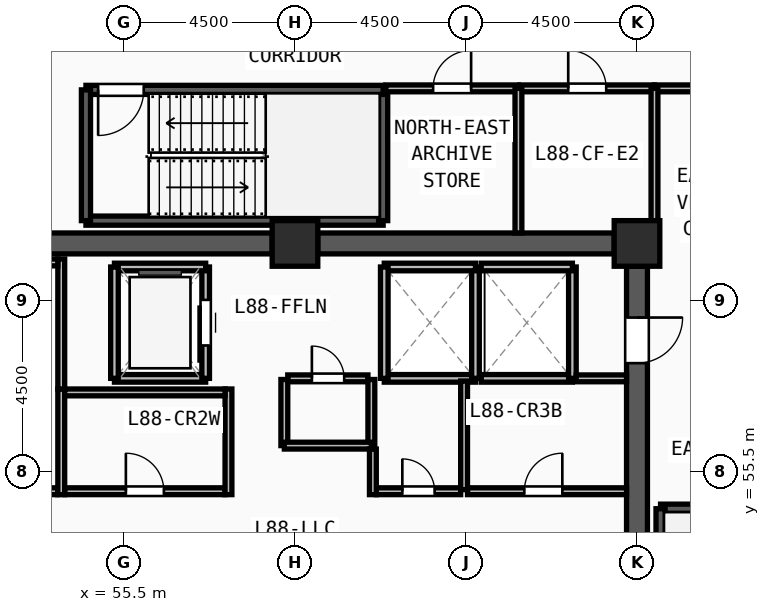
"""IFC4 building model, lengths in metres.
Left out: names, types, materials, properties, quantities, classifications, styles, units other than length and angle.
Written with IfcOpenShell. Run it as: python <this file> out.ifc"""

import sys

from ifc_helpers import new_model, si_unit, direction, frame, frame_2d, origin, origin_2d, place, context, subcontext, project, spatial, rectangle, extrude, source, transform, mapped, element, fill, save


model = new_model("IFC4")
c1 = context("Model", 3, precision=1e-05, world=origin(), true_north=direction((0.0, 1.0)))
c2 = subcontext(c1, "Body", "Model", "MODEL_VIEW")
j1 = project(units=[si_unit("LENGTHUNIT", "METRE"), si_unit("PLANEANGLEUNIT", "RADIAN")], contexts=[c1])
p1 = place(None, origin())
s1 = spatial("IfcSite", under=j1, at=p1, CompositionType="ELEMENT")
p2 = place(p1, origin())
s2 = spatial("IfcBuilding", under=s1, at=p2, CompositionType="ELEMENT")
p3 = place(p2, frame((0.0, 0.0, 339.75)))
s3 = spatial("IfcBuildingStorey", under=s2, at=p3, CompositionType="ELEMENT", Elevation=339.75)
m1 = source(origin(), c2, "Body", "SweptSolid", [
    extrude(rectangle(XDim=1.2, YDim=1.2, at=origin_2d()), origin(), (0.0, 0.0, 1.0), 3.75),
])
for number, where, z_axis, x_axis in (
    (1, (69.0, 61.5, 0.0), (0.0, 0.0, 1.0), (1.0, 0.0, 0.0)),
    (2, (60.0, 61.5, 0.0), (0.0, 0.0, 1.0), (1.0, 0.0, 0.0)),
):
    element("IfcColumn", number, at=place(p3, frame(where, z_axis=z_axis, x_axis=x_axis)), inside=s3, PredefinedType="COLUMN", context=c2, shape_type="MappedRepresentation", body=[
        mapped(m1, transform((0.0, 0.0, 0.0), x_axis=(1.0, 0.0, 0.0), y_axis=(0.0, 1.0, 0.0), z_axis=(0.0, 0.0, 1.0), scale=1.0)),
    ])
for number, where, z_axis, x_axis in (
    (3, (51.6, 61.5, 0.0), (0.0, 0.0, 1.0), (1.0, 0.0, 0.0)),
    (4, (60.6, 61.5, 0.0), (0.0, 0.0, 1.0), (1.0, 0.0, 0.0)),
):
    element("IfcWall", number, at=place(p3, frame(where, z_axis=z_axis, x_axis=x_axis)), inside=s3, PredefinedType="SHEAR", context=c2, shape_type="SweptSolid", body=[
        extrude(rectangle(XDim=7.8, YDim=0.55, at=frame_2d((3.9, 0.0))), origin(), (0.0, 0.0, 1.0), 3.57),
    ])
p4 = place(p3, frame((69.0, 60.9, 0.0), z_axis=(0.0, 0.0, 1.0), x_axis=(0.0, -1.0, 0.0)))
e5 = element("IfcWall", 5, at=p4, inside=s3, PredefinedType="SHEAR", context=c2, shape_type="SweptSolid", body=[
    extrude(rectangle(XDim=13.8, YDim=0.55, at=frame_2d((6.9, 0.0))), origin(), (0.0, 0.0, 1.0), 3.57),
])
m2 = source(origin(), c2, "Body", "SweptSolid", [
    extrude(rectangle(XDim=1.2, YDim=2.2, at=frame_2d((0.6, 1.1))), frame((0.0, 0.285, 0.0), z_axis=(0.0, -1.0, 0.0), x_axis=(1.0, 0.0, 0.0)), (0.0, 0.0, 1.0), 0.57),
])
p5 = place(p4, frame((1.35, 0.0, 0.0)))
e6 = element("IfcOpeningElement", 6, at=p5, cuts=e5, PredefinedType="OPENING", context=c2, shape_type="MappedRepresentation", body=[
    mapped(m2, transform((0.0, 0.0, 0.0), x_axis=(1.0, 0.0, 0.0), y_axis=(0.0, 1.0, 0.0), z_axis=(0.0, 0.0, 1.0), scale=1.0)),
])
p6 = place(p3, frame((73.06, 54.52, 0.0), z_axis=(0.0, 0.0, 1.0), x_axis=(-1.0, 0.0, 0.0)))
e7 = element("IfcWall", 7, at=p6, inside=s3, PredefinedType="SOLIDWALL", context=c2, shape_type="SweptSolid", body=[
    extrude(rectangle(XDim=3.44, YDim=0.24, at=frame_2d((1.72, 0.0))), origin(), (0.0, 0.0, 1.0), 3.57),
])
for number, where, z_axis, x_axis in (
    (8, (69.62, 54.52, 0.0), (0.0, 0.0, 1.0), (0.0, -1.0, 0.0)),
    (9, (54.5, 62.1, 0.0), (0.0, 0.0, 1.0), (1.0, 0.0, 0.0)),
):
    element("IfcWall", number, at=place(p3, frame(where, z_axis=z_axis, x_axis=x_axis)), inside=s3, PredefinedType="SOLIDWALL", context=c2, shape_type="SweptSolid", body=[
        extrude(rectangle(XDim=7.82, YDim=0.24, at=frame_2d((3.91, 0.0))), origin(), (0.0, 0.0, 1.0), 3.57),
    ])
p7 = place(p3, frame((62.32, 62.1, 0.0), z_axis=(0.0, 0.0, 1.0), x_axis=(0.0, 1.0, 0.0)))
e10 = element("IfcWall", 10, at=p7, inside=s3, PredefinedType="SOLIDWALL", context=c2, shape_type="SweptSolid", body=[
    extrude(rectangle(XDim=3.44, YDim=0.24, at=frame_2d((1.72, 0.0))), origin(), (0.0, 0.0, 1.0), 3.57),
])
p8 = place(p3, frame((62.32, 65.54, 0.0), z_axis=(0.0, 0.0, 1.0), x_axis=(-1.0, 0.0, 0.0)))
e11 = element("IfcWall", 11, at=p8, inside=s3, PredefinedType="SOLIDWALL", context=c2, shape_type="SweptSolid", body=[
    extrude(rectangle(XDim=7.82, YDim=0.24, at=frame_2d((3.91, 0.0))), origin(), (0.0, 0.0, 1.0), 3.57),
])
m3 = source(origin(), c2, "Body", "SweptSolid", [
    extrude(rectangle(XDim=1.2, YDim=2.2, at=frame_2d((0.6, 1.1))), frame((0.0, 0.13, 0.0), z_axis=(0.0, -1.0, 0.0), x_axis=(1.0, 0.0, 0.0)), (0.0, 0.0, 1.0), 0.26),
])
p9 = place(p8, frame((6.3, 0.0, 0.0)))
e12 = element("IfcOpeningElement", 12, at=p9, cuts=e11, PredefinedType="OPENING", context=c2, shape_type="MappedRepresentation", body=[
    mapped(m3, transform((0.0, 0.0, 0.0), x_axis=(1.0, 0.0, 0.0), y_axis=(0.0, 1.0, 0.0), z_axis=(0.0, 0.0, 1.0), scale=1.0)),
])
p10 = place(p3, frame((54.5, 65.54, 0.0), z_axis=(0.0, 0.0, 1.0), x_axis=(0.0, -1.0, 0.0)))
e13 = element("IfcWall", 13, at=p10, inside=s3, PredefinedType="SOLIDWALL", context=c2, shape_type="SweptSolid", body=[
    extrude(rectangle(XDim=3.44, YDim=0.24, at=frame_2d((1.72, 0.0))), origin(), (0.0, 0.0, 1.0), 3.57),
])
p11 = place(p3, frame((55.25, 57.95, 0.0), z_axis=(0.0, 0.0, 1.0), x_axis=(1.0, 0.0, 0.0)))
e14 = element("IfcWall", 14, at=p11, inside=s3, PredefinedType="SOLIDWALL", context=c2, shape_type="SweptSolid", body=[
    extrude(rectangle(XDim=2.4, YDim=0.2, at=frame_2d((1.2, 0.0))), origin(), (0.0, 0.0, 1.0), 3.57),
])
p12 = place(p3, frame((57.65, 57.95, 0.0), z_axis=(0.0, 0.0, 1.0), x_axis=(0.0, 1.0, 0.0)))
e15 = element("IfcWall", 15, at=p12, inside=s3, PredefinedType="SOLIDWALL", context=c2, shape_type="SweptSolid", body=[
    extrude(rectangle(XDim=2.93, YDim=0.2, at=frame_2d((1.465, 0.0))), origin(), (0.0, 0.0, 1.0), 3.57),
])
m4 = source(origin(), c2, "Body", "SweptSolid", [
    extrude(rectangle(XDim=1.2, YDim=2.3, at=frame_2d((0.6, 1.15))), frame((0.0, 0.11, 0.0), z_axis=(0.0, -1.0, 0.0), x_axis=(1.0, 0.0, 0.0)), (0.0, 0.0, 1.0), 0.22),
])
p13 = place(p12, frame((0.865, 0.0, 0.0)))
e16 = element("IfcOpeningElement", 16, at=p13, cuts=e15, PredefinedType="OPENING", context=c2, shape_type="MappedRepresentation", body=[
    mapped(m4, transform((0.0, 0.0, 0.0), x_axis=(1.0, 0.0, 0.0), y_axis=(0.0, 1.0, 0.0), z_axis=(0.0, 0.0, 1.0), scale=1.0)),
])
p14 = place(p3, frame((57.65, 60.88, 0.0), z_axis=(0.0, 0.0, 1.0), x_axis=(-1.0, 0.0, 0.0)))
e17 = element("IfcWall", 17, at=p14, inside=s3, PredefinedType="SOLIDWALL", context=c2, shape_type="SweptSolid", body=[
    extrude(rectangle(XDim=2.4, YDim=0.2, at=frame_2d((1.2, 0.0))), origin(), (0.0, 0.0, 1.0), 3.57),
])
p15 = place(p3, frame((55.25, 60.88, 0.0), z_axis=(0.0, 0.0, 1.0), x_axis=(0.0, -1.0, 0.0)))
e18 = element("IfcWall", 18, at=p15, inside=s3, PredefinedType="SOLIDWALL", context=c2, shape_type="SweptSolid", body=[
    extrude(rectangle(XDim=2.93, YDim=0.2, at=frame_2d((1.465, 0.0))), origin(), (0.0, 0.0, 1.0), 3.57),
])
p16 = place(p3, frame((62.35, 57.95, 0.0), z_axis=(0.0, 0.0, 1.0), x_axis=(1.0, 0.0, 0.0)))
e19 = element("IfcWall", 19, at=p16, inside=s3, PredefinedType="SOLIDWALL", context=c2, shape_type="SweptSolid", body=[
    extrude(rectangle(XDim=2.4, YDim=0.2, at=frame_2d((1.2, 0.0))), origin(), (0.0, 0.0, 1.0), 3.57),
])
p17 = place(p3, frame((64.75, 57.95, 0.0), z_axis=(0.0, 0.0, 1.0), x_axis=(0.0, 1.0, 0.0)))
e20 = element("IfcWall", 20, at=p17, inside=s3, PredefinedType="SOLIDWALL", context=c2, shape_type="SweptSolid", body=[
    extrude(rectangle(XDim=2.93, YDim=0.2, at=frame_2d((1.465, 0.0))), origin(), (0.0, 0.0, 1.0), 3.57),
])
p18 = place(p3, frame((64.75, 60.88, 0.0), z_axis=(0.0, 0.0, 1.0), x_axis=(-1.0, 0.0, 0.0)))
e21 = element("IfcWall", 21, at=p18, inside=s3, PredefinedType="SOLIDWALL", context=c2, shape_type="SweptSolid", body=[
    extrude(rectangle(XDim=2.4, YDim=0.2, at=frame_2d((1.2, 0.0))), origin(), (0.0, 0.0, 1.0), 3.57),
])
p19 = place(p3, frame((62.35, 60.88, 0.0), z_axis=(0.0, 0.0, 1.0), x_axis=(0.0, -1.0, 0.0)))
e22 = element("IfcWall", 22, at=p19, inside=s3, PredefinedType="SOLIDWALL", context=c2, shape_type="SweptSolid", body=[
    extrude(rectangle(XDim=2.93, YDim=0.2, at=frame_2d((1.465, 0.0))), origin(), (0.0, 0.0, 1.0), 3.57),
])
p20 = place(p3, frame((64.9, 57.95, 0.0), z_axis=(0.0, 0.0, 1.0), x_axis=(1.0, 0.0, 0.0)))
e23 = element("IfcWall", 23, at=p20, inside=s3, PredefinedType="SOLIDWALL", context=c2, shape_type="SweptSolid", body=[
    extrude(rectangle(XDim=2.4, YDim=0.2, at=frame_2d((1.2, 0.0))), origin(), (0.0, 0.0, 1.0), 3.57),
])
p21 = place(p3, frame((67.3, 57.95, 0.0), z_axis=(0.0, 0.0, 1.0), x_axis=(0.0, 1.0, 0.0)))
e24 = element("IfcWall", 24, at=p21, inside=s3, PredefinedType="SOLIDWALL", context=c2, shape_type="SweptSolid", body=[
    extrude(rectangle(XDim=2.93, YDim=0.2, at=frame_2d((1.465, 0.0))), origin(), (0.0, 0.0, 1.0), 3.57),
])
p22 = place(p3, frame((67.3, 60.88, 0.0), z_axis=(0.0, 0.0, 1.0), x_axis=(-1.0, 0.0, 0.0)))
e25 = element("IfcWall", 25, at=p22, inside=s3, PredefinedType="SOLIDWALL", context=c2, shape_type="SweptSolid", body=[
    extrude(rectangle(XDim=2.4, YDim=0.2, at=frame_2d((1.2, 0.0))), origin(), (0.0, 0.0, 1.0), 3.57),
])
p23 = place(p3, frame((53.94, 54.98, 0.0), z_axis=(0.0, 0.0, 1.0), x_axis=(1.0, 0.0, 0.0)))
e26 = element("IfcWall", 26, at=p23, inside=s3, PredefinedType="PARTITIONING", context=c2, shape_type="SweptSolid", body=[
    extrude(rectangle(XDim=4.22, YDim=0.18, at=frame_2d((2.11, 0.0))), origin(), (0.0, 0.0, 1.0), 3.57),
])
m5 = source(origin(), c2, "Body", "SweptSolid", [
    extrude(rectangle(XDim=1.0, YDim=2.2, at=frame_2d((0.5, 1.1))), frame((0.0, 0.1, 0.0), z_axis=(0.0, -1.0, 0.0), x_axis=(1.0, 0.0, 0.0)), (0.0, 0.0, 1.0), 0.2),
])
p24 = place(p23, frame((1.61, 0.0, 0.0)))
e27 = element("IfcOpeningElement", 27, at=p24, cuts=e26, PredefinedType="OPENING", context=c2, shape_type="MappedRepresentation", body=[
    mapped(m5, transform((0.0, 0.0, 0.0), x_axis=(1.0, 0.0, 0.0), y_axis=(0.0, 1.0, 0.0), z_axis=(0.0, 0.0, 1.0), scale=1.0)),
])
p25 = place(p3, frame((51.275, 54.98, 0.0), z_axis=(0.0, 0.0, 1.0), x_axis=(1.0, 0.0, 0.0)))
e28 = element("IfcWall", 28, at=p25, inside=s3, PredefinedType="PARTITIONING", context=c2, shape_type="SweptSolid", body=[
    extrude(rectangle(XDim=2.485, YDim=0.18, at=frame_2d((1.243, 0.0))), origin(), (0.0, 0.0, 1.0), 3.57),
])
m6 = source(origin(), c2, "Body", "SweptSolid", [
    extrude(rectangle(XDim=0.85, YDim=2.1, at=frame_2d((0.425, 1.05))), frame((0.0, 0.1, 0.0), z_axis=(0.0, -1.0, 0.0), x_axis=(1.0, 0.0, 0.0)), (0.0, 0.0, 1.0), 0.2),
])
p26 = place(p25, frame((0.915, 0.0, 0.0)))
e29 = element("IfcOpeningElement", 29, at=p26, cuts=e28, PredefinedType="OPENING", context=c2, shape_type="MappedRepresentation", body=[
    mapped(m6, transform((0.0, 0.0, 0.0), x_axis=(1.0, 0.0, 0.0), y_axis=(0.0, 1.0, 0.0), z_axis=(0.0, 0.0, 1.0), scale=1.0)),
])
p27 = place(p3, frame((62.14, 54.98, 0.0), z_axis=(0.0, 0.0, 1.0), x_axis=(1.0, 0.0, 0.0)))
e30 = element("IfcWall", 30, at=p27, inside=s3, PredefinedType="PARTITIONING", context=c2, shape_type="SweptSolid", body=[
    extrude(rectangle(XDim=2.22, YDim=0.18, at=frame_2d((1.11, 0.0))), origin(), (0.0, 0.0, 1.0), 3.57),
])
p28 = place(p27, frame((0.685, 0.0, 0.0)))
e31 = element("IfcOpeningElement", 31, at=p28, cuts=e30, PredefinedType="OPENING", context=c2, shape_type="MappedRepresentation", body=[
    mapped(m6, transform((0.0, 0.0, 0.0), x_axis=(1.0, 0.0, 0.0), y_axis=(0.0, 1.0, 0.0), z_axis=(0.0, 0.0, 1.0), scale=1.0)),
])
p29 = place(p3, frame((64.54, 54.98, 0.0), z_axis=(0.0, 0.0, 1.0), x_axis=(1.0, 0.0, 0.0)))
e32 = element("IfcWall", 32, at=p29, inside=s3, PredefinedType="PARTITIONING", context=c2, shape_type="SweptSolid", body=[
    extrude(rectangle(XDim=4.185, YDim=0.18, at=frame_2d((2.093, 0.0))), origin(), (0.0, 0.0, 1.0), 3.57),
])
p30 = place(p29, frame((1.495, 0.0, 0.0)))
e33 = element("IfcOpeningElement", 33, at=p30, cuts=e32, PredefinedType="OPENING", context=c2, shape_type="MappedRepresentation", body=[
    mapped(m5, transform((0.0, 0.0, 0.0), x_axis=(1.0, 0.0, 0.0), y_axis=(0.0, 1.0, 0.0), z_axis=(0.0, 0.0, 1.0), scale=1.0)),
])
p31 = place(p3, frame((59.81, 57.95, 0.0), z_axis=(0.0, 0.0, 1.0), x_axis=(1.0, 0.0, 0.0)))
e34 = element("IfcWall", 34, at=p31, inside=s3, PredefinedType="PARTITIONING", context=c2, shape_type="SweptSolid", body=[
    extrude(rectangle(XDim=2.11, YDim=0.18, at=frame_2d((1.055, 0.0))), origin(), (0.0, 0.0, 1.0), 3.57),
])
p32 = place(p31, frame((0.635, 0.0, 0.0)))
e35 = element("IfcOpeningElement", 35, at=p32, cuts=e34, PredefinedType="OPENING", context=c2, shape_type="MappedRepresentation", body=[
    mapped(m6, transform((0.0, 0.0, 0.0), x_axis=(1.0, 0.0, 0.0), y_axis=(0.0, 1.0, 0.0), z_axis=(0.0, 0.0, 1.0), scale=1.0)),
])
p33 = place(p3, frame((62.39, 65.58, 0.0), z_axis=(0.0, 0.0, 1.0), x_axis=(1.0, 0.0, 0.0)))
e36 = element("IfcWall", 36, at=p33, inside=s3, PredefinedType="PARTITIONING", context=c2, shape_type="SweptSolid", body=[
    extrude(rectangle(XDim=3.49, YDim=0.18, at=frame_2d((1.745, 0.0))), origin(), (0.0, 0.0, 1.0), 3.57),
])
p34 = place(p33, frame((1.245, 0.0, 0.0)))
e37 = element("IfcOpeningElement", 37, at=p34, cuts=e36, PredefinedType="OPENING", context=c2, shape_type="MappedRepresentation", body=[
    mapped(m5, transform((0.0, 0.0, 0.0), x_axis=(1.0, 0.0, 0.0), y_axis=(0.0, 1.0, 0.0), z_axis=(0.0, 0.0, 1.0), scale=1.0)),
])
p35 = place(p3, frame((65.92, 65.58, 0.0), z_axis=(0.0, 0.0, 1.0), x_axis=(1.0, 0.0, 0.0)))
e38 = element("IfcWall", 38, at=p35, inside=s3, PredefinedType="PARTITIONING", context=c2, shape_type="SweptSolid", body=[
    extrude(rectangle(XDim=3.54, YDim=0.18, at=frame_2d((1.77, 0.0))), origin(), (0.0, 0.0, 1.0), 3.57),
])
p36 = place(p35, frame((1.27, 0.0, 0.0)))
e39 = element("IfcOpeningElement", 39, at=p36, cuts=e38, PredefinedType="OPENING", context=c2, shape_type="MappedRepresentation", body=[
    mapped(m5, transform((0.0, 0.0, 0.0), x_axis=(1.0, 0.0, 0.0), y_axis=(0.0, 1.0, 0.0), z_axis=(0.0, 0.0, 1.0), scale=1.0)),
])
p37 = place(p3, frame((69.46, 65.58, 0.0), z_axis=(0.0, 0.0, 1.0), x_axis=(1.0, 0.0, 0.0)))
e40 = element("IfcWall", 40, at=p37, inside=s3, PredefinedType="PARTITIONING", context=c2, shape_type="SweptSolid", body=[
    extrude(rectangle(XDim=3.84, YDim=0.18, at=frame_2d((1.92, 0.0))), origin(), (0.0, 0.0, 1.0), 3.57),
])
m7 = source(origin(), c2, "Body", "SweptSolid", [
    extrude(rectangle(XDim=1.3, YDim=2.2, at=frame_2d((0.65, 1.1))), frame((0.0, 0.1, 0.0), z_axis=(0.0, -1.0, 0.0), x_axis=(1.0, 0.0, 0.0)), (0.0, 0.0, 1.0), 0.2),
])
p38 = place(p37, frame((1.27, 0.0, 0.0)))
e41 = element("IfcOpeningElement", 41, at=p38, cuts=e40, PredefinedType="OPENING", context=c2, shape_type="MappedRepresentation", body=[
    mapped(m7, transform((0.0, 0.0, 0.0), x_axis=(1.0, 0.0, 0.0), y_axis=(0.0, 1.0, 0.0), z_axis=(0.0, 0.0, 1.0), scale=1.0)),
])
p39 = place(p3, frame((64.45, 55.02, 0.0), z_axis=(0.0, 0.0, 1.0), x_axis=(0.0, 1.0, 0.0)))
e42 = element("IfcWall", 42, at=p39, inside=s3, PredefinedType="PARTITIONING", context=c2, shape_type="SweptSolid", body=[
    extrude(rectangle(XDim=2.86, YDim=0.18, at=frame_2d((1.43, 0.0))), origin(), (0.0, 0.0, 1.0), 3.57),
])
for number, where, z_axis, x_axis in (
    (43, (59.72, 56.18, 0.0), (0.0, 0.0, 1.0), (0.0, 1.0, 0.0)),
    (44, (62.01, 56.18, 0.0), (0.0, 0.0, 1.0), (0.0, 1.0, 0.0)),
):
    element("IfcWall", number, at=place(p3, frame(where, z_axis=z_axis, x_axis=x_axis)), inside=s3, PredefinedType="PARTITIONING", context=c2, shape_type="SweptSolid", body=[
        extrude(rectangle(XDim=1.74, YDim=0.18, at=frame_2d((0.87, 0.0))), origin(), (0.0, 0.0, 1.0), 3.57),
    ])
p40 = place(p3, frame((59.72, 56.18, 0.0), z_axis=(0.0, 0.0, 1.0), x_axis=(1.0, 0.0, 0.0)))
e45 = element("IfcWall", 45, at=p40, inside=s3, PredefinedType="PARTITIONING", context=c2, shape_type="SweptSolid", body=[
    extrude(rectangle(XDim=2.29, YDim=0.18, at=frame_2d((1.145, 0.0))), origin(), (0.0, 0.0, 1.0), 3.57),
])
p41 = place(p3, frame((65.88, 61.775, 0.0), z_axis=(0.0, 0.0, 1.0), x_axis=(0.0, 1.0, 0.0)))
e46 = element("IfcWall", 46, at=p41, inside=s3, PredefinedType="PARTITIONING", context=c2, shape_type="SweptSolid", body=[
    extrude(rectangle(XDim=3.805, YDim=0.18, at=frame_2d((1.903, 0.0))), origin(), (0.0, 0.0, 1.0), 3.57),
])
p42 = place(p3, frame((69.46, 61.95, 0.0), z_axis=(0.0, 0.0, 1.0), x_axis=(0.0, 1.0, 0.0)))
e47 = element("IfcWall", 47, at=p42, inside=s3, PredefinedType="PARTITIONING", context=c2, shape_type="SweptSolid", body=[
    extrude(rectangle(XDim=3.63, YDim=0.18, at=frame_2d((1.815, 0.0))), origin(), (0.0, 0.0, 1.0), 3.57),
])
for number, where, z_axis, x_axis in (
    (48, (53.85, 54.89, 0.0), (0.0, 0.0, 1.0), (0.0, 1.0, 0.0)),
    (49, (58.25, 54.89, 0.0), (0.0, 0.0, 1.0), (0.0, 1.0, 0.0)),
):
    element("IfcWall", number, at=place(p3, frame(where, z_axis=z_axis, x_axis=x_axis)), inside=s3, PredefinedType="PARTITIONING", context=c2, shape_type="SweptSolid", body=[
        extrude(rectangle(XDim=2.78, YDim=0.18, at=frame_2d((1.39, 0.0))), origin(), (0.0, 0.0, 1.0), 3.57),
    ])
p43 = place(p3, frame((53.94, 57.58, 0.0), z_axis=(0.0, 0.0, 1.0), x_axis=(1.0, 0.0, 0.0)))
e50 = element("IfcWall", 50, at=p43, inside=s3, PredefinedType="PARTITIONING", context=c2, shape_type="SweptSolid", body=[
    extrude(rectangle(XDim=4.22, YDim=0.18, at=frame_2d((2.11, 0.0))), origin(), (0.0, 0.0, 1.0), 3.57),
])
p44 = place(p3, frame((53.85, 57.67, 0.0), z_axis=(0.0, 0.0, 1.0), x_axis=(0.0, 1.0, 0.0)))
e51 = element("IfcWall", 51, at=p44, inside=s3, PredefinedType="PARTITIONING", context=c2, shape_type="SweptSolid", body=[
    extrude(rectangle(XDim=3.42, YDim=0.18, at=frame_2d((1.71, 0.0))), origin(), (0.0, 0.0, 1.0), 3.57),
])
p45 = place(p3, frame((51.437, 61.0, 0.0), z_axis=(0.0, 0.0, 1.0), x_axis=(1.0, 0.0, 0.0)))
e52 = element("IfcWall", 52, at=p45, inside=s3, PredefinedType="PARTITIONING", context=c2, shape_type="SweptSolid", body=[
    extrude(rectangle(XDim=2.323, YDim=0.18, at=frame_2d((1.162, 0.0))), origin(), (0.0, 0.0, 1.0), 3.57),
])
p46 = place(p3, frame((62.05, 54.89, 0.0), z_axis=(0.0, 0.0, 1.0), x_axis=(0.0, 1.0, 0.0)))
e53 = element("IfcWall", 53, at=p46, inside=s3, PredefinedType="PARTITIONING", context=c2, shape_type="SweptSolid", body=[
    extrude(rectangle(XDim=1.2, YDim=0.18, at=frame_2d((0.6, 0.0))), origin(), (0.0, 0.0, 1.0), 3.57),
])
p47 = place(p3, frame((67.4, 57.95, 0.0), z_axis=(0.0, 0.0, 1.0), x_axis=(1.0, 0.0, 0.0)))
e54 = element("IfcWall", 54, at=p47, inside=s3, PredefinedType="PARTITIONING", context=c2, shape_type="SweptSolid", body=[
    extrude(rectangle(XDim=1.325, YDim=0.18, at=frame_2d((0.663, 0.0))), origin(), (0.0, 0.0, 1.0), 3.57),
])
m8 = source(origin(), c2, "Body", "SweptSolid", [
    extrude(rectangle(XDim=1.2, YDim=2.2, at=frame_2d((0.6, 1.1))), frame((0.0, 0.025, 0.0), z_axis=(0.0, -1.0, 0.0), x_axis=(1.0, 0.0, 0.0)), (0.0, 0.0, 1.0), 0.05),
])
p48 = place(p5, origin())
e55 = element("IfcDoor", 55, at=p48, inside=s3, OperationType="SINGLE_SWING_LEFT", PredefinedType="DOOR", context=c2, shape_type="MappedRepresentation", body=[
    mapped(m8, transform((0.0, 0.0, 0.0), x_axis=(1.0, 0.0, 0.0), y_axis=(0.0, 1.0, 0.0), z_axis=(0.0, 0.0, 1.0), scale=1.0)),
])
fill(e6, e55)
p49 = place(p9, origin())
e56 = element("IfcDoor", 56, at=p49, inside=s3, OperationType="SINGLE_SWING_RIGHT", PredefinedType="DOOR", context=c2, shape_type="MappedRepresentation", body=[
    mapped(m8, transform((0.0, 0.0, 0.0), x_axis=(1.0, 0.0, 0.0), y_axis=(0.0, 1.0, 0.0), z_axis=(0.0, 0.0, 1.0), scale=1.0)),
])
fill(e12, e56)
m9 = source(origin(), c2, "Body", "SweptSolid", [
    extrude(rectangle(XDim=1.2, YDim=2.3, at=frame_2d((0.6, 1.15))), frame((0.0, 0.025, 0.0), z_axis=(0.0, -1.0, 0.0), x_axis=(1.0, 0.0, 0.0)), (0.0, 0.0, 1.0), 0.05),
])
p50 = place(p13, origin())
e57 = element("IfcDoor", 57, at=p50, inside=s3, OperationType="SLIDING_TO_LEFT", PredefinedType="DOOR", context=c2, shape_type="MappedRepresentation", body=[
    mapped(m9, transform((0.0, 0.0, 0.0), x_axis=(1.0, 0.0, 0.0), y_axis=(0.0, 1.0, 0.0), z_axis=(0.0, 0.0, 1.0), scale=1.0)),
])
fill(e16, e57)
m10 = source(origin(), c2, "Body", "SweptSolid", [
    extrude(rectangle(XDim=1.0, YDim=2.2, at=frame_2d((0.5, 1.1))), frame((0.0, 0.025, 0.0), z_axis=(0.0, -1.0, 0.0), x_axis=(1.0, 0.0, 0.0)), (0.0, 0.0, 1.0), 0.05),
])
p51 = place(p24, origin())
e58 = element("IfcDoor", 58, at=p51, inside=s3, OperationType="SINGLE_SWING_LEFT", PredefinedType="DOOR", context=c2, shape_type="MappedRepresentation", body=[
    mapped(m10, transform((0.0, 0.0, 0.0), x_axis=(1.0, 0.0, 0.0), y_axis=(0.0, 1.0, 0.0), z_axis=(0.0, 0.0, 1.0), scale=1.0)),
])
fill(e27, e58)
m11 = source(origin(), c2, "Body", "SweptSolid", [
    extrude(rectangle(XDim=0.85, YDim=2.1, at=frame_2d((0.425, 1.05))), frame((0.0, 0.025, 0.0), z_axis=(0.0, -1.0, 0.0), x_axis=(1.0, 0.0, 0.0)), (0.0, 0.0, 1.0), 0.05),
])
p52 = place(p28, origin())
e59 = element("IfcDoor", 59, at=p52, inside=s3, OperationType="SINGLE_SWING_LEFT", PredefinedType="DOOR", context=c2, shape_type="MappedRepresentation", body=[
    mapped(m11, transform((0.0, 0.0, 0.0), x_axis=(1.0, 0.0, 0.0), y_axis=(0.0, 1.0, 0.0), z_axis=(0.0, 0.0, 1.0), scale=1.0)),
])
fill(e31, e59)
p53 = place(p30, origin())
e60 = element("IfcDoor", 60, at=p53, inside=s3, OperationType="SINGLE_SWING_RIGHT", PredefinedType="DOOR", context=c2, shape_type="MappedRepresentation", body=[
    mapped(m10, transform((0.0, 0.0, 0.0), x_axis=(1.0, 0.0, 0.0), y_axis=(0.0, 1.0, 0.0), z_axis=(0.0, 0.0, 1.0), scale=1.0)),
])
fill(e33, e60)
p54 = place(p32, origin())
e61 = element("IfcDoor", 61, at=p54, inside=s3, OperationType="SINGLE_SWING_LEFT", PredefinedType="DOOR", context=c2, shape_type="MappedRepresentation", body=[
    mapped(m11, transform((0.0, 0.0, 0.0), x_axis=(1.0, 0.0, 0.0), y_axis=(0.0, 1.0, 0.0), z_axis=(0.0, 0.0, 1.0), scale=1.0)),
])
fill(e35, e61)
p55 = place(p34, origin())
e62 = element("IfcDoor", 62, at=p55, inside=s3, OperationType="SINGLE_SWING_RIGHT", PredefinedType="DOOR", context=c2, shape_type="MappedRepresentation", body=[
    mapped(m10, transform((0.0, 0.0, 0.0), x_axis=(1.0, 0.0, 0.0), y_axis=(0.0, 1.0, 0.0), z_axis=(0.0, 0.0, 1.0), scale=1.0)),
])
fill(e37, e62)
p56 = place(p36, origin())
e63 = element("IfcDoor", 63, at=p56, inside=s3, OperationType="SINGLE_SWING_LEFT", PredefinedType="DOOR", context=c2, shape_type="MappedRepresentation", body=[
    mapped(m10, transform((0.0, 0.0, 0.0), x_axis=(1.0, 0.0, 0.0), y_axis=(0.0, 1.0, 0.0), z_axis=(0.0, 0.0, 1.0), scale=1.0)),
])
fill(e39, e63)
save(model, sys.argv[1])
